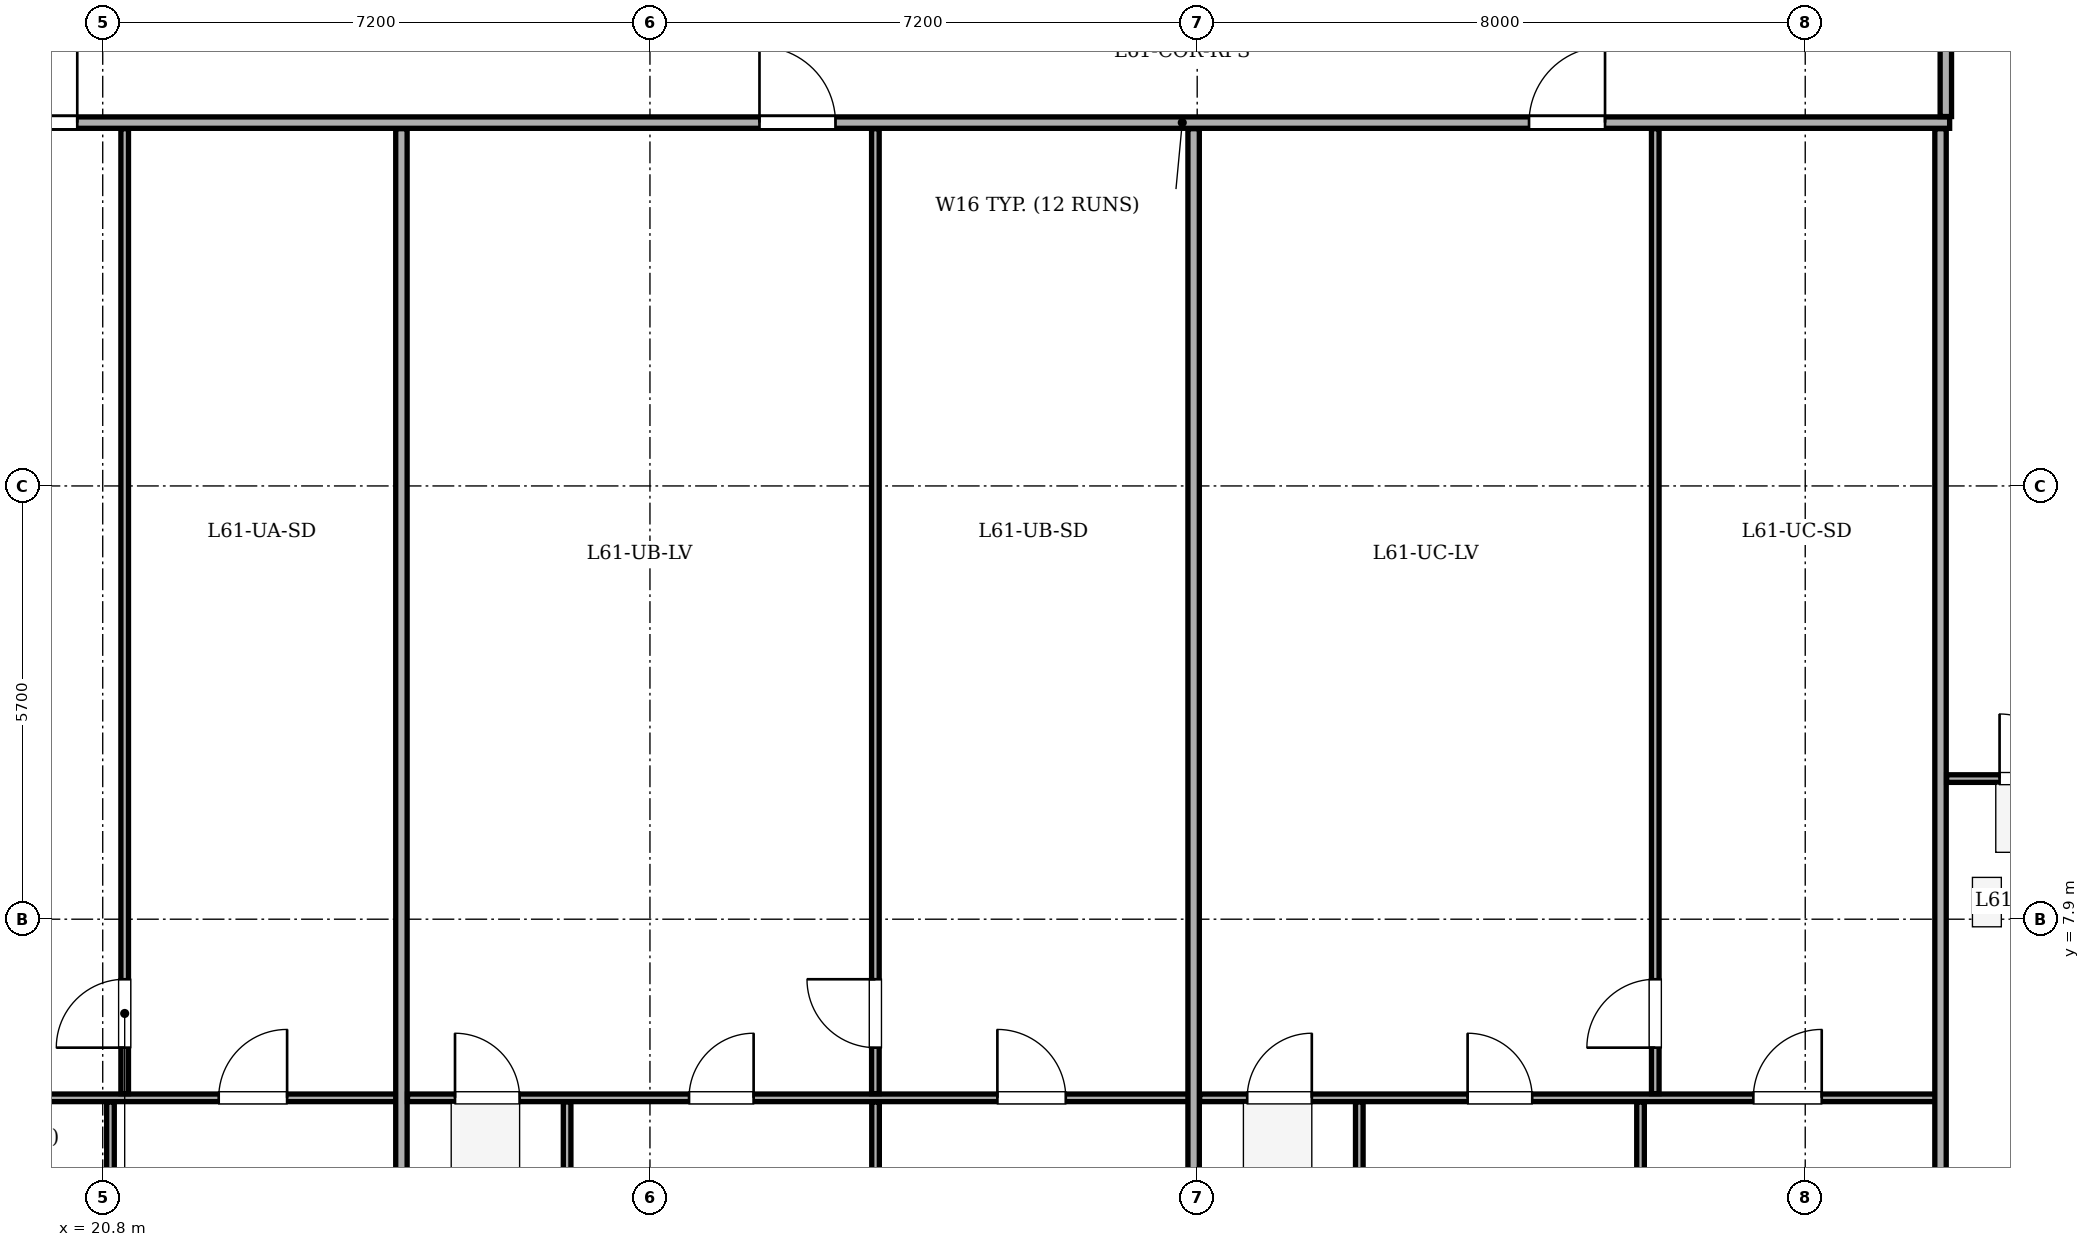
"""IFC4 building model, lengths in metres.
Left out: names, types, materials, properties, quantities, classifications, styles, units other than length and angle.
Written with IfcOpenShell. Run it as: python <this file> out.ifc"""

import sys

from ifc_helpers import new_model, si_unit, direction, frame, frame_2d, origin, place, context, subcontext, project, spatial, rectangle, extrude, element, fill, save


model = new_model("IFC4")
c1 = context("Model", 3, precision=1e-05, world=origin(), true_north=direction((0.0, 1.0)))
c2 = subcontext(c1, "Body", "Model", "MODEL_VIEW")
j1 = project(units=[si_unit("LENGTHUNIT", "METRE"), si_unit("PLANEANGLEUNIT", "RADIAN")], contexts=[c1])
p1 = place(None, origin())
s1 = spatial("IfcSite", under=j1, at=p1, CompositionType="ELEMENT")
p2 = place(p1, origin())
s2 = spatial("IfcBuilding", under=s1, at=p2, CompositionType="ELEMENT")
p3 = place(p2, frame((0.0, 0.0, 234.7)))
s3 = spatial("IfcBuildingStorey", under=s2, at=p3, CompositionType="ELEMENT", Elevation=234.7)
p4 = place(p3, frame((15.08, 18.38, 0.0), z_axis=(0.0, 0.0, 1.0), x_axis=(1.0, 0.0, 0.0)))
e1 = element("IfcWall", 1, at=p4, inside=s3, PredefinedType="PARTITIONING", context=c2, shape_type="SweptSolid", body=[
    extrude(rectangle(XDim=30.02, YDim=0.15, at=frame_2d((15.01, 0.0))), origin(), (0.0, 0.0, 1.0), 3.1),
])
p5 = place(p4, frame((4.385, 0.0, 0.0)))
e2 = element("IfcOpeningElement", 2, at=p5, cuts=e1, PredefinedType="OPENING", context=c2, shape_type="SweptSolid", body=[
    extrude(rectangle(XDim=1.0, YDim=2.1, at=frame_2d((0.5, 1.05))), frame((0.0, 0.085, 0.0), z_axis=(0.0, -1.0, 0.0), x_axis=(1.0, 0.0, 0.0)), (0.0, 0.0, 1.0), 0.17),
])
p6 = place(p4, frame((14.361, 0.0, 0.0)))
e3 = element("IfcOpeningElement", 3, at=p6, cuts=e1, PredefinedType="OPENING", context=c2, shape_type="SweptSolid", body=[
    extrude(rectangle(XDim=1.0, YDim=2.1, at=frame_2d((0.5, 1.05))), frame((0.0, 0.085, 0.0), z_axis=(0.0, -1.0, 0.0), x_axis=(1.0, 0.0, 0.0)), (0.0, 0.0, 1.0), 0.17),
])
p7 = place(p4, frame((24.486, 0.0, 0.0)))
e4 = element("IfcOpeningElement", 4, at=p7, cuts=e1, PredefinedType="OPENING", context=c2, shape_type="SweptSolid", body=[
    extrude(rectangle(XDim=1.0, YDim=2.1, at=frame_2d((0.5, 1.05))), frame((0.0, 0.085, 0.0), z_axis=(0.0, -1.0, 0.0), x_axis=(1.0, 0.0, 0.0)), (0.0, 0.0, 1.0), 0.17),
])
p8 = place(p3, frame((15.28, 5.55, 0.0), z_axis=(0.0, 0.0, 1.0), x_axis=(1.0, 0.0, 0.0)))
e5 = element("IfcWall", 5, at=p8, inside=s3, PredefinedType="PARTITIONING", context=c2, shape_type="SweptSolid", body=[
    extrude(rectangle(XDim=9.49, YDim=0.1, at=frame_2d((4.745, 0.0))), origin(), (0.0, 0.0, 1.0), 3.1),
])
p9 = place(p8, frame((0.625, 0.0, 0.0)))
e6 = element("IfcOpeningElement", 6, at=p9, cuts=e5, PredefinedType="OPENING", context=c2, shape_type="SweptSolid", body=[
    extrude(rectangle(XDim=0.85, YDim=2.05, at=frame_2d((0.425, 1.025))), frame((0.0, 0.06, 0.0), z_axis=(0.0, -1.0, 0.0), x_axis=(1.0, 0.0, 0.0)), (0.0, 0.0, 1.0), 0.12),
])
p10 = place(p8, frame((3.436, 0.0, 0.0)))
e7 = element("IfcOpeningElement", 7, at=p10, cuts=e5, PredefinedType="OPENING", context=c2, shape_type="SweptSolid", body=[
    extrude(rectangle(XDim=0.85, YDim=2.05, at=frame_2d((0.425, 1.025))), frame((0.0, 0.06, 0.0), z_axis=(0.0, -1.0, 0.0), x_axis=(1.0, 0.0, 0.0)), (0.0, 0.0, 1.0), 0.12),
])
p11 = place(p8, frame((7.046, 0.0, 0.0)))
e8 = element("IfcOpeningElement", 8, at=p11, cuts=e5, PredefinedType="OPENING", context=c2, shape_type="SweptSolid", body=[
    extrude(rectangle(XDim=0.9, YDim=2.05, at=frame_2d((0.45, 1.025))), frame((0.0, 0.06, 0.0), z_axis=(0.0, -1.0, 0.0), x_axis=(1.0, 0.0, 0.0)), (0.0, 0.0, 1.0), 0.12),
])
p12 = place(p3, frame((21.089, 5.605, 0.0), z_axis=(0.0, 0.0, 1.0), x_axis=(0.0, 1.0, 0.0)))
e9 = element("IfcWall", 9, at=p12, inside=s3, PredefinedType="PARTITIONING", context=c2, shape_type="SweptSolid", body=[
    extrude(rectangle(XDim=12.695, YDim=0.1, at=frame_2d((6.348, 0.0))), origin(), (0.0, 0.0, 1.0), 2.535),
])
p13 = place(p12, frame((0.605, 0.0, 0.0)))
e10 = element("IfcOpeningElement", 10, at=p13, cuts=e9, PredefinedType="OPENING", context=c2, shape_type="SweptSolid", body=[
    extrude(rectangle(XDim=0.9, YDim=2.05, at=frame_2d((0.45, 1.025))), frame((0.0, 0.06, 0.0), z_axis=(0.0, -1.0, 0.0), x_axis=(1.0, 0.0, 0.0)), (0.0, 0.0, 1.0), 0.12),
])
p14 = place(p3, frame((20.902, 3.045, 0.0), z_axis=(0.0, 0.0, 1.0), x_axis=(0.0, 1.0, 0.0)))
e11 = element("IfcWall", 11, at=p14, inside=s3, PredefinedType="PARTITIONING", context=c2, shape_type="SweptSolid", body=[
    extrude(rectangle(XDim=2.45, YDim=0.1, at=frame_2d((1.225, 0.0))), origin(), (0.0, 0.0, 1.0), 2.535),
])
p15 = place(p3, frame((24.73, 3.045, 0.0), z_axis=(0.0, 0.0, 1.0), x_axis=(0.0, 1.0, 0.0)))
e12 = element("IfcWall", 12, at=p15, inside=s3, PredefinedType="PARTITIONING", context=c2, shape_type="SweptSolid", body=[
    extrude(rectangle(XDim=15.255, YDim=0.15, at=frame_2d((7.627, 0.0))), origin(), (0.0, 0.0, 1.0), 3.1),
])
p16 = place(p3, frame((24.81, 5.55, 0.0), z_axis=(0.0, 0.0, 1.0), x_axis=(1.0, 0.0, 0.0)))
e13 = element("IfcWall", 13, at=p16, inside=s3, PredefinedType="PARTITIONING", context=c2, shape_type="SweptSolid", body=[
    extrude(rectangle(XDim=10.383, YDim=0.1, at=frame_2d((5.191, 0.0))), origin(), (0.0, 0.0, 1.0), 3.1),
])
p17 = place(p16, frame((0.625, 0.0, 0.0)))
e14 = element("IfcOpeningElement", 14, at=p17, cuts=e13, PredefinedType="OPENING", context=c2, shape_type="SweptSolid", body=[
    extrude(rectangle(XDim=0.85, YDim=2.05, at=frame_2d((0.425, 1.025))), frame((0.0, 0.06, 0.0), z_axis=(0.0, -1.0, 0.0), x_axis=(1.0, 0.0, 0.0)), (0.0, 0.0, 1.0), 0.12),
])
p18 = place(p16, frame((3.704, 0.0, 0.0)))
e15 = element("IfcOpeningElement", 15, at=p18, cuts=e13, PredefinedType="OPENING", context=c2, shape_type="SweptSolid", body=[
    extrude(rectangle(XDim=0.85, YDim=2.05, at=frame_2d((0.425, 1.025))), frame((0.0, 0.06, 0.0), z_axis=(0.0, -1.0, 0.0), x_axis=(1.0, 0.0, 0.0)), (0.0, 0.0, 1.0), 0.12),
])
p19 = place(p16, frame((7.761, 0.0, 0.0)))
e16 = element("IfcOpeningElement", 16, at=p19, cuts=e13, PredefinedType="OPENING", context=c2, shape_type="SweptSolid", body=[
    extrude(rectangle(XDim=0.9, YDim=2.05, at=frame_2d((0.45, 1.025))), frame((0.0, 0.06, 0.0), z_axis=(0.0, -1.0, 0.0), x_axis=(1.0, 0.0, 0.0)), (0.0, 0.0, 1.0), 0.12),
])
p20 = place(p3, frame((30.966, 5.605, 0.0), z_axis=(0.0, 0.0, 1.0), x_axis=(0.0, 1.0, 0.0)))
e17 = element("IfcWall", 17, at=p20, inside=s3, PredefinedType="PARTITIONING", context=c2, shape_type="SweptSolid", body=[
    extrude(rectangle(XDim=12.695, YDim=0.1, at=frame_2d((6.348, 0.0))), origin(), (0.0, 0.0, 1.0), 3.1),
])
p21 = place(p20, frame((0.605, 0.0, 0.0)))
e18 = element("IfcOpeningElement", 18, at=p21, cuts=e17, PredefinedType="OPENING", context=c2, shape_type="SweptSolid", body=[
    extrude(rectangle(XDim=0.9, YDim=2.05, at=frame_2d((0.45, 1.025))), frame((0.0, 0.06, 0.0), z_axis=(0.0, -1.0, 0.0), x_axis=(1.0, 0.0, 0.0)), (0.0, 0.0, 1.0), 0.12),
])
for number, where, z_axis, x_axis in (
    (19, (26.91, 3.045, 0.0), (0.0, 0.0, 1.0), (0.0, 1.0, 0.0)),
    (20, (30.968, 3.045, 0.0), (0.0, 0.0, 1.0), (0.0, 1.0, 0.0)),
):
    element("IfcWall", number, at=place(p3, frame(where, z_axis=z_axis, x_axis=x_axis)), inside=s3, PredefinedType="PARTITIONING", context=c2, shape_type="SweptSolid", body=[
        extrude(rectangle(XDim=2.45, YDim=0.1, at=frame_2d((1.225, 0.0))), origin(), (0.0, 0.0, 1.0), 3.1),
    ])
p22 = place(p3, frame((35.153, 3.045, 0.0), z_axis=(0.0, 0.0, 1.0), x_axis=(0.0, 1.0, 0.0)))
e21 = element("IfcWall", 21, at=p22, inside=s3, PredefinedType="PARTITIONING", context=c2, shape_type="SweptSolid", body=[
    extrude(rectangle(XDim=15.255, YDim=0.15, at=frame_2d((7.627, 0.0))), origin(), (0.0, 0.0, 1.0), 2.535),
])
p23 = place(p3, frame((35.233, 5.55, 0.0), z_axis=(0.0, 0.0, 1.0), x_axis=(1.0, 0.0, 0.0)))
e22 = element("IfcWall", 22, at=p23, inside=s3, PredefinedType="PARTITIONING", context=c2, shape_type="SweptSolid", body=[
    extrude(rectangle(XDim=9.787, YDim=0.1, at=frame_2d((4.894, 0.0))), origin(), (0.0, 0.0, 1.0), 3.1),
])
p24 = place(p23, frame((0.625, 0.0, 0.0)))
e23 = element("IfcOpeningElement", 23, at=p24, cuts=e22, PredefinedType="OPENING", context=c2, shape_type="SweptSolid", body=[
    extrude(rectangle(XDim=0.85, YDim=2.05, at=frame_2d((0.425, 1.025))), frame((0.0, 0.06, 0.0), z_axis=(0.0, -1.0, 0.0), x_axis=(1.0, 0.0, 0.0)), (0.0, 0.0, 1.0), 0.12),
])
p25 = place(p23, frame((3.525, 0.0, 0.0)))
e24 = element("IfcOpeningElement", 24, at=p25, cuts=e22, PredefinedType="OPENING", context=c2, shape_type="SweptSolid", body=[
    extrude(rectangle(XDim=0.85, YDim=2.05, at=frame_2d((0.425, 1.025))), frame((0.0, 0.06, 0.0), z_axis=(0.0, -1.0, 0.0), x_axis=(1.0, 0.0, 0.0)), (0.0, 0.0, 1.0), 0.12),
])
p26 = place(p23, frame((7.284, 0.0, 0.0)))
e25 = element("IfcOpeningElement", 25, at=p26, cuts=e22, PredefinedType="OPENING", context=c2, shape_type="SweptSolid", body=[
    extrude(rectangle(XDim=0.9, YDim=2.05, at=frame_2d((0.45, 1.025))), frame((0.0, 0.06, 0.0), z_axis=(0.0, -1.0, 0.0), x_axis=(1.0, 0.0, 0.0)), (0.0, 0.0, 1.0), 0.12),
])
p27 = place(p3, frame((41.227, 5.605, 0.0), z_axis=(0.0, 0.0, 1.0), x_axis=(0.0, 1.0, 0.0)))
e26 = element("IfcWall", 26, at=p27, inside=s3, PredefinedType="PARTITIONING", context=c2, shape_type="SweptSolid", body=[
    extrude(rectangle(XDim=12.695, YDim=0.1, at=frame_2d((6.348, 0.0))), origin(), (0.0, 0.0, 1.0), 3.1),
])
p28 = place(p27, frame((0.605, 0.0, 0.0)))
e27 = element("IfcOpeningElement", 27, at=p28, cuts=e26, PredefinedType="OPENING", context=c2, shape_type="SweptSolid", body=[
    extrude(rectangle(XDim=0.9, YDim=2.05, at=frame_2d((0.45, 1.025))), frame((0.0, 0.06, 0.0), z_axis=(0.0, -1.0, 0.0), x_axis=(1.0, 0.0, 0.0)), (0.0, 0.0, 1.0), 0.12),
])
for number, where, z_axis, x_axis in (
    (28, (37.333, 3.045, 0.0), (0.0, 0.0, 1.0), (0.0, 1.0, 0.0)),
    (29, (41.033, 3.045, 0.0), (0.0, 0.0, 1.0), (0.0, 1.0, 0.0)),
):
    element("IfcWall", number, at=place(p3, frame(where, z_axis=z_axis, x_axis=x_axis)), inside=s3, PredefinedType="PARTITIONING", context=c2, shape_type="SweptSolid", body=[
        extrude(rectangle(XDim=2.45, YDim=0.1, at=frame_2d((1.225, 0.0))), origin(), (0.0, 0.0, 1.0), 3.1),
    ])
p29 = place(p3, frame((44.98, 3.045, 0.0), z_axis=(0.0, 0.0, 1.0), x_axis=(0.0, 1.0, 0.0)))
e30 = element("IfcWall", 30, at=p29, inside=s3, PredefinedType="PARTITIONING", context=c2, shape_type="SweptSolid", body=[
    extrude(rectangle(XDim=15.255, YDim=0.15, at=frame_2d((7.627, 0.0))), origin(), (0.0, 0.0, 1.0), 2.725),
])
p30 = place(p3, frame((45.05, 18.46, 0.0), z_axis=(0.0, 0.0, 1.0), x_axis=(0.0, 1.0, 0.0)))
e31 = element("IfcWall", 31, at=p30, inside=s3, PredefinedType="PARTITIONING", context=c2, shape_type="SweptSolid", body=[
    extrude(rectangle(XDim=1.79, YDim=0.15, at=frame_2d((0.895, 0.0))), origin(), (0.0, 0.0, 1.0), 2.725),
])
p31 = place(p3, frame((45.06, 9.75, 0.0), z_axis=(0.0, 0.0, 1.0), x_axis=(1.0, 0.0, 0.0)))
e32 = element("IfcWall", 32, at=p31, inside=s3, PredefinedType="PARTITIONING", context=c2, shape_type="SweptSolid", body=[
    extrude(rectangle(XDim=10.295, YDim=0.1, at=frame_2d((5.147, 0.0))), origin(), (0.0, 0.0, 1.0), 3.1),
])
p32 = place(p31, frame((0.697, 0.0, 0.0)))
e33 = element("IfcOpeningElement", 33, at=p32, cuts=e32, PredefinedType="OPENING", context=c2, shape_type="SweptSolid", body=[
    extrude(rectangle(XDim=0.85, YDim=2.05, at=frame_2d((0.425, 1.025))), frame((0.0, 0.06, 0.0), z_axis=(0.0, -1.0, 0.0), x_axis=(1.0, 0.0, 0.0)), (0.0, 0.0, 1.0), 0.12),
])
p33 = place(p31, frame((3.068, 0.0, 0.0)))
e34 = element("IfcOpeningElement", 34, at=p33, cuts=e32, PredefinedType="OPENING", context=c2, shape_type="SweptSolid", body=[
    extrude(rectangle(XDim=0.85, YDim=2.05, at=frame_2d((0.425, 1.025))), frame((0.0, 0.06, 0.0), z_axis=(0.0, -1.0, 0.0), x_axis=(1.0, 0.0, 0.0)), (0.0, 0.0, 1.0), 0.12),
])
p34 = place(p31, frame((5.384, 0.0, 0.0)))
e35 = element("IfcOpeningElement", 35, at=p34, cuts=e32, PredefinedType="OPENING", context=c2, shape_type="SweptSolid", body=[
    extrude(rectangle(XDim=0.9, YDim=2.05, at=frame_2d((0.45, 1.025))), frame((0.0, 0.06, 0.0), z_axis=(0.0, -1.0, 0.0), x_axis=(1.0, 0.0, 0.0)), (0.0, 0.0, 1.0), 0.12),
])
p35 = place(p31, frame((8.208, 0.0, 0.0)))
e36 = element("IfcOpeningElement", 36, at=p35, cuts=e32, PredefinedType="OPENING", context=c2, shape_type="SweptSolid", body=[
    extrude(rectangle(XDim=0.9, YDim=2.05, at=frame_2d((0.45, 1.025))), frame((0.0, 0.06, 0.0), z_axis=(0.0, -1.0, 0.0), x_axis=(1.0, 0.0, 0.0)), (0.0, 0.0, 1.0), 0.12),
])
p36 = place(p5, origin())
e37 = element("IfcDoor", 37, at=p36, inside=s3, OperationType="SINGLE_SWING_RIGHT", PredefinedType="DOOR", context=c2, shape_type="SweptSolid", body=[
    extrude(rectangle(XDim=1.0, YDim=2.1, at=frame_2d((0.5, 1.05))), frame((0.0, 0.025, 0.0), z_axis=(0.0, -1.0, 0.0), x_axis=(1.0, 0.0, 0.0)), (0.0, 0.0, 1.0), 0.05),
])
fill(e2, e37)
p37 = place(p6, origin())
e38 = element("IfcDoor", 38, at=p37, inside=s3, OperationType="SINGLE_SWING_LEFT", PredefinedType="DOOR", context=c2, shape_type="SweptSolid", body=[
    extrude(rectangle(XDim=1.0, YDim=2.1, at=frame_2d((0.5, 1.05))), frame((0.0, 0.025, 0.0), z_axis=(0.0, -1.0, 0.0), x_axis=(1.0, 0.0, 0.0)), (0.0, 0.0, 1.0), 0.05),
])
fill(e3, e38)
p38 = place(p7, origin())
e39 = element("IfcDoor", 39, at=p38, inside=s3, OperationType="SINGLE_SWING_RIGHT", PredefinedType="DOOR", context=c2, shape_type="SweptSolid", body=[
    extrude(rectangle(XDim=1.0, YDim=2.1, at=frame_2d((0.5, 1.05))), frame((0.0, 0.025, 0.0), z_axis=(0.0, -1.0, 0.0), x_axis=(1.0, 0.0, 0.0)), (0.0, 0.0, 1.0), 0.05),
])
fill(e4, e39)
p39 = place(p13, origin())
e40 = element("IfcDoor", 40, at=p39, inside=s3, OperationType="SINGLE_SWING_LEFT", PredefinedType="DOOR", context=c2, shape_type="SweptSolid", body=[
    extrude(rectangle(XDim=0.9, YDim=2.05, at=frame_2d((0.45, 1.025))), frame((0.0, 0.025, 0.0), z_axis=(0.0, -1.0, 0.0), x_axis=(1.0, 0.0, 0.0)), (0.0, 0.0, 1.0), 0.05),
])
fill(e10, e40)
p40 = place(p11, origin())
e41 = element("IfcDoor", 41, at=p40, inside=s3, OperationType="SINGLE_SWING_RIGHT", PredefinedType="DOOR", context=c2, shape_type="SweptSolid", body=[
    extrude(rectangle(XDim=0.9, YDim=2.05, at=frame_2d((0.45, 1.025))), frame((0.0, 0.025, 0.0), z_axis=(0.0, -1.0, 0.0), x_axis=(1.0, 0.0, 0.0)), (0.0, 0.0, 1.0), 0.05),
])
fill(e8, e41)
p41 = place(p21, origin())
e42 = element("IfcDoor", 42, at=p41, inside=s3, OperationType="SINGLE_SWING_RIGHT", PredefinedType="DOOR", context=c2, shape_type="SweptSolid", body=[
    extrude(rectangle(XDim=0.9, YDim=2.05, at=frame_2d((0.45, 1.025))), frame((0.0, 0.025, 0.0), z_axis=(0.0, -1.0, 0.0), x_axis=(1.0, 0.0, 0.0)), (0.0, 0.0, 1.0), 0.05),
])
fill(e18, e42)
p42 = place(p17, origin())
e43 = element("IfcDoor", 43, at=p42, inside=s3, OperationType="SINGLE_SWING_LEFT", PredefinedType="DOOR", context=c2, shape_type="SweptSolid", body=[
    extrude(rectangle(XDim=0.85, YDim=2.05, at=frame_2d((0.425, 1.025))), frame((0.0, 0.025, 0.0), z_axis=(0.0, -1.0, 0.0), x_axis=(1.0, 0.0, 0.0)), (0.0, 0.0, 1.0), 0.05),
])
fill(e14, e43)
p43 = place(p18, origin())
e44 = element("IfcDoor", 44, at=p43, inside=s3, OperationType="SINGLE_SWING_RIGHT", PredefinedType="DOOR", context=c2, shape_type="SweptSolid", body=[
    extrude(rectangle(XDim=0.85, YDim=2.05, at=frame_2d((0.425, 1.025))), frame((0.0, 0.025, 0.0), z_axis=(0.0, -1.0, 0.0), x_axis=(1.0, 0.0, 0.0)), (0.0, 0.0, 1.0), 0.05),
])
fill(e15, e44)
p44 = place(p19, origin())
e45 = element("IfcDoor", 45, at=p44, inside=s3, OperationType="SINGLE_SWING_LEFT", PredefinedType="DOOR", context=c2, shape_type="SweptSolid", body=[
    extrude(rectangle(XDim=0.9, YDim=2.05, at=frame_2d((0.45, 1.025))), frame((0.0, 0.025, 0.0), z_axis=(0.0, -1.0, 0.0), x_axis=(1.0, 0.0, 0.0)), (0.0, 0.0, 1.0), 0.05),
])
fill(e16, e45)
p45 = place(p28, origin())
e46 = element("IfcDoor", 46, at=p45, inside=s3, OperationType="SINGLE_SWING_LEFT", PredefinedType="DOOR", context=c2, shape_type="SweptSolid", body=[
    extrude(rectangle(XDim=0.9, YDim=2.05, at=frame_2d((0.45, 1.025))), frame((0.0, 0.025, 0.0), z_axis=(0.0, -1.0, 0.0), x_axis=(1.0, 0.0, 0.0)), (0.0, 0.0, 1.0), 0.05),
])
fill(e27, e46)
p46 = place(p24, origin())
e47 = element("IfcDoor", 47, at=p46, inside=s3, OperationType="SINGLE_SWING_RIGHT", PredefinedType="DOOR", context=c2, shape_type="SweptSolid", body=[
    extrude(rectangle(XDim=0.85, YDim=2.05, at=frame_2d((0.425, 1.025))), frame((0.0, 0.025, 0.0), z_axis=(0.0, -1.0, 0.0), x_axis=(1.0, 0.0, 0.0)), (0.0, 0.0, 1.0), 0.05),
])
fill(e23, e47)
p47 = place(p25, origin())
e48 = element("IfcDoor", 48, at=p47, inside=s3, OperationType="SINGLE_SWING_LEFT", PredefinedType="DOOR", context=c2, shape_type="SweptSolid", body=[
    extrude(rectangle(XDim=0.85, YDim=2.05, at=frame_2d((0.425, 1.025))), frame((0.0, 0.025, 0.0), z_axis=(0.0, -1.0, 0.0), x_axis=(1.0, 0.0, 0.0)), (0.0, 0.0, 1.0), 0.05),
])
fill(e24, e48)
p48 = place(p26, origin())
e49 = element("IfcDoor", 49, at=p48, inside=s3, OperationType="SINGLE_SWING_RIGHT", PredefinedType="DOOR", context=c2, shape_type="SweptSolid", body=[
    extrude(rectangle(XDim=0.9, YDim=2.05, at=frame_2d((0.45, 1.025))), frame((0.0, 0.025, 0.0), z_axis=(0.0, -1.0, 0.0), x_axis=(1.0, 0.0, 0.0)), (0.0, 0.0, 1.0), 0.05),
])
fill(e25, e49)
p49 = place(p32, origin())
e50 = element("IfcDoor", 50, at=p49, inside=s3, OperationType="SINGLE_SWING_LEFT", PredefinedType="DOOR", context=c2, shape_type="SweptSolid", body=[
    extrude(rectangle(XDim=0.85, YDim=2.05, at=frame_2d((0.425, 1.025))), frame((0.0, 0.025, 0.0), z_axis=(0.0, -1.0, 0.0), x_axis=(1.0, 0.0, 0.0)), (0.0, 0.0, 1.0), 0.05),
])
fill(e33, e50)
save(model, sys.argv[1])
